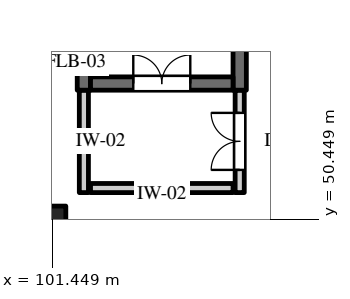
"""IFC4 building model, lengths in metres.
Left out: names, types, materials, properties, quantities, classifications, styles, units other than length and angle.
Written with IfcOpenShell. Run it as: python <this file> out.ifc"""

import sys

from ifc_helpers import new_model, si_unit, direction, frame, frame_2d, origin, origin_2d, place, context, subcontext, project, spatial, rectangle, extrude, element, fill, save


model = new_model("IFC4")
c1 = context("Model", 3, precision=1e-05, world=origin(), true_north=direction((0.0, 1.0)))
c2 = subcontext(c1, "Body", "Model", "MODEL_VIEW")
j1 = project(units=[si_unit("LENGTHUNIT", "METRE"), si_unit("PLANEANGLEUNIT", "RADIAN")], contexts=[c1])
p1 = place(None, origin())
s1 = spatial("IfcSite", under=j1, at=p1, CompositionType="ELEMENT")
p2 = place(p1, origin())
s2 = spatial("IfcBuilding", under=s1, at=p2, CompositionType="ELEMENT")
p3 = place(p2, frame((0.0, 0.0, 14.4)))
s3 = spatial("IfcBuildingStorey", under=s2, at=p3, CompositionType="ELEMENT", Elevation=14.4)
p4 = place(p3, frame((101.4, 50.4, 0.0), z_axis=(0.0, 0.0, 1.0), x_axis=(1.0, 0.0, 0.0)))
e1 = element("IfcColumn", 1, at=p4, inside=s3, PredefinedType="COLUMN", context=c2, shape_type="SweptSolid", body=[
    extrude(rectangle(XDim=0.8, YDim=0.8, at=origin_2d()), origin(), (0.0, 0.0, 1.0), 3.6),
])
for number, where, z_axis, x_axis in (
    (2, (102.275, 53.85, 0.0), (0.0, 0.0, 1.0), (0.0, 1.0, 0.0)),
    (3, (106.375, 53.85, 0.0), (0.0, 0.0, 1.0), (0.0, 1.0, 0.0)),
):
    element("IfcWall", number, at=place(p3, frame(where, z_axis=z_axis, x_axis=x_axis)), inside=s3, PredefinedType="SHEAR", context=c2, shape_type="SweptSolid", body=[
        extrude(rectangle(XDim=10.5, YDim=0.35, at=frame_2d((5.25, 0.0))), origin(), (0.0, 0.0, 1.0), 3.6),
    ])
p5 = place(p3, frame((102.45, 54.025, 0.0), z_axis=(0.0, 0.0, 1.0), x_axis=(1.0, 0.0, 0.0)))
e4 = element("IfcWall", 4, at=p5, inside=s3, PredefinedType="SHEAR", context=c2, shape_type="SweptSolid", body=[
    extrude(rectangle(XDim=3.75, YDim=0.35, at=frame_2d((1.875, 0.0))), origin(), (0.0, 0.0, 1.0), 3.27),
])
p6 = place(p5, frame((1.125, 0.0, 0.0)))
e5 = element("IfcOpeningElement", 5, at=p6, cuts=e4, PredefinedType="OPENING", context=c2, shape_type="SweptSolid", body=[
    extrude(rectangle(XDim=1.5, YDim=2.2, at=frame_2d((0.75, 1.1))), frame((0.0, 0.187, 0.0), z_axis=(0.0, -1.0, 0.0), x_axis=(1.0, 0.0, 0.0)), (0.0, 0.0, 1.0), 0.374),
])
p7 = place(p3, frame((102.275, 51.155, 0.0), z_axis=(0.0, 0.0, 1.0), x_axis=(0.0, 1.0, 0.0)))
e6 = element("IfcWall", 6, at=p7, inside=s3, PredefinedType="STANDARD", context=c2, shape_type="SweptSolid", body=[
    extrude(rectangle(XDim=2.695, YDim=0.24, at=frame_2d((1.348, 0.0))), origin(), (0.0, 0.0, 1.0), 3.27),
])
p8 = place(p3, frame((106.375, 51.155, 0.0), z_axis=(0.0, 0.0, 1.0), x_axis=(0.0, 1.0, 0.0)))
e7 = element("IfcWall", 7, at=p8, inside=s3, PredefinedType="STANDARD", context=c2, shape_type="SweptSolid", body=[
    extrude(rectangle(XDim=2.695, YDim=0.24, at=frame_2d((1.348, 0.0))), origin(), (0.0, 0.0, 1.0), 3.27),
])
p9 = place(p8, frame((0.597, 0.0, 0.0)))
e8 = element("IfcOpeningElement", 8, at=p9, cuts=e7, PredefinedType="OPENING", context=c2, shape_type="SweptSolid", body=[
    extrude(rectangle(XDim=1.5, YDim=2.2, at=frame_2d((0.75, 1.1))), frame((0.0, 0.132, 0.0), z_axis=(0.0, -1.0, 0.0), x_axis=(1.0, 0.0, 0.0)), (0.0, 0.0, 1.0), 0.264),
])
p10 = place(p3, frame((102.45, 51.275, 0.0), z_axis=(0.0, 0.0, 1.0), x_axis=(1.0, 0.0, 0.0)))
e9 = element("IfcWall", 9, at=p10, inside=s3, PredefinedType="STANDARD", context=c2, shape_type="SweptSolid", body=[
    extrude(rectangle(XDim=3.75, YDim=0.24, at=frame_2d((1.875, 0.0))), origin(), (0.0, 0.0, 1.0), 3.27),
])
p11 = place(p6, origin())
e10 = element("IfcDoor", 10, at=p11, inside=s3, OperationType="DOUBLE_DOOR_SINGLE_SWING", PredefinedType="DOOR", context=c2, shape_type="SweptSolid", body=[
    extrude(rectangle(XDim=1.5, YDim=2.2, at=frame_2d((0.75, 1.1))), frame((0.0, 0.025, 0.0), z_axis=(0.0, -1.0, 0.0), x_axis=(1.0, 0.0, 0.0)), (0.0, 0.0, 1.0), 0.05),
])
fill(e5, e10)
p12 = place(p9, origin())
e11 = element("IfcDoor", 11, at=p12, inside=s3, OperationType="DOUBLE_DOOR_SINGLE_SWING", PredefinedType="DOOR", context=c2, shape_type="SweptSolid", body=[
    extrude(rectangle(XDim=1.5, YDim=2.2, at=frame_2d((0.75, 1.1))), frame((0.0, 0.025, 0.0), z_axis=(0.0, -1.0, 0.0), x_axis=(1.0, 0.0, 0.0)), (0.0, 0.0, 1.0), 0.05),
])
fill(e8, e11)
save(model, sys.argv[1])
